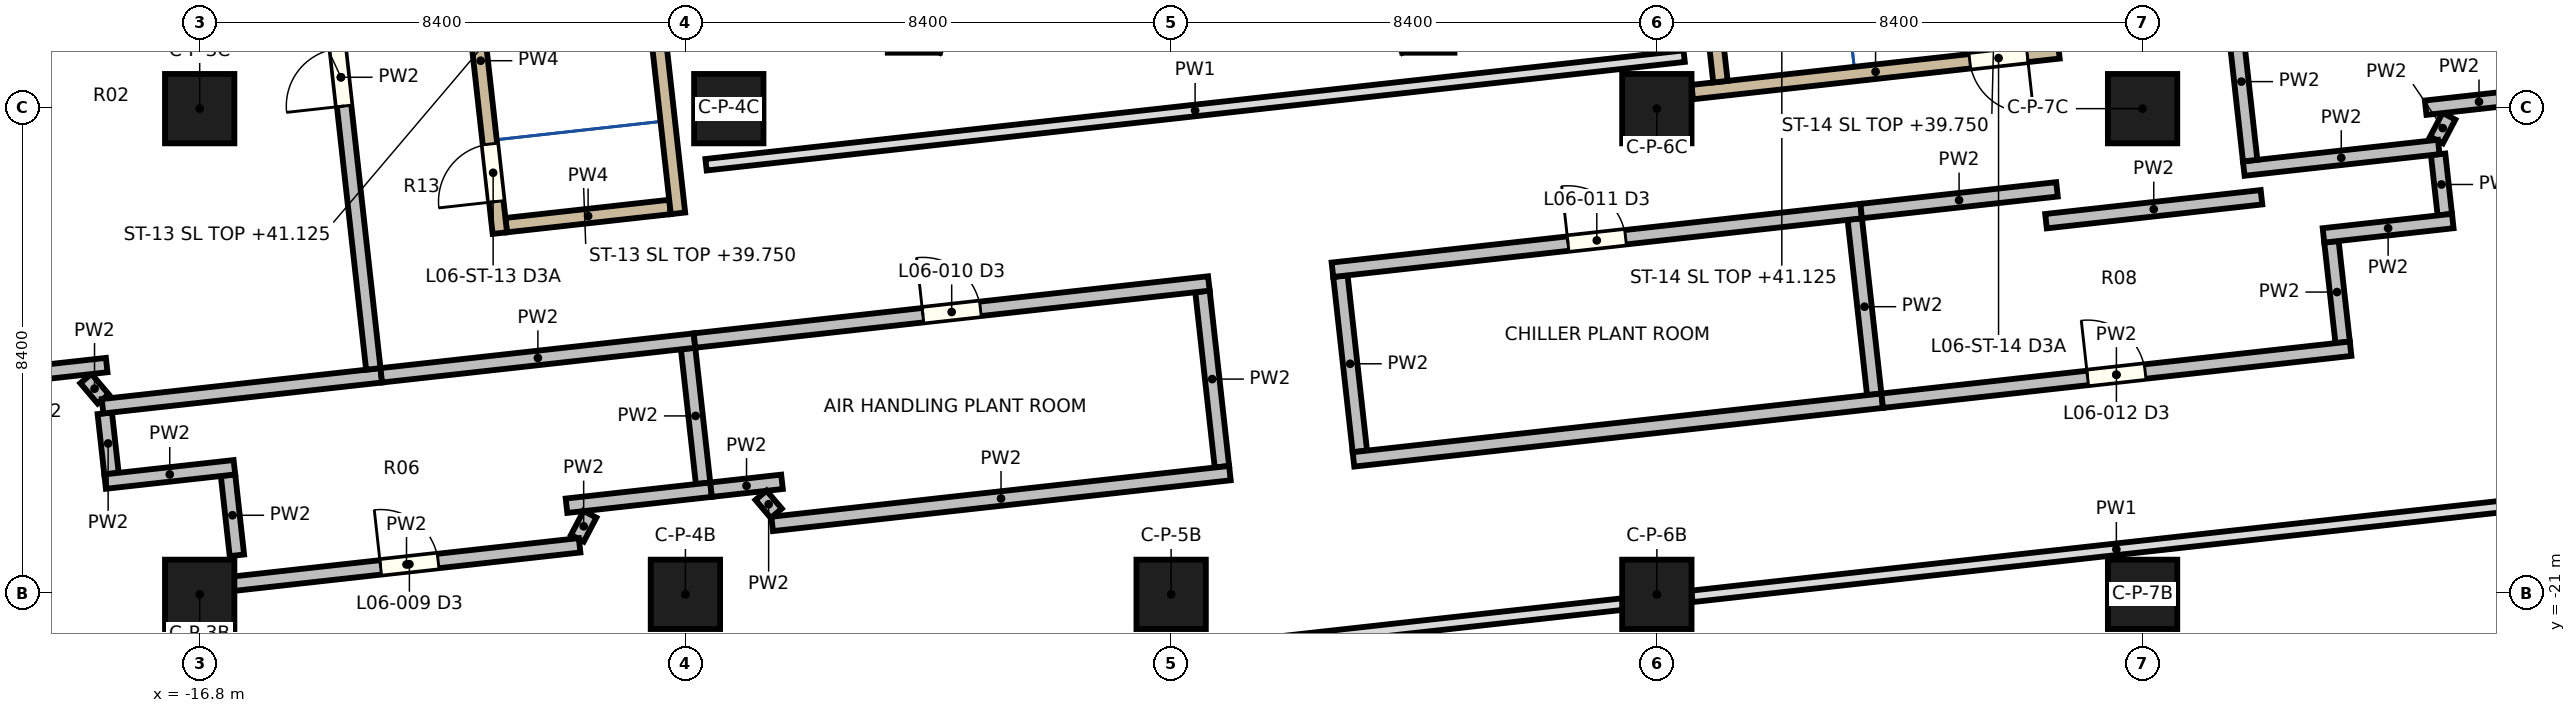
"""IFC4 building model, lengths in metres.
Left out: names, types, materials, properties, quantities, classifications, styles, units other than length and angle.
Written with IfcOpenShell. Run it as: python <this file> out.ifc"""

import sys

from ifc_helpers import new_model, si_unit, direction, frame, frame_2d, origin, origin_2d, place, context, subcontext, project, spatial, rectangle, extrude, element, fill, save


model = new_model("IFC4")
c1 = context("Model", 3, precision=1e-05, world=origin(), true_north=direction((0.0, 1.0)))
c2 = subcontext(c1, "Body", "Model", "MODEL_VIEW")
j1 = project(units=[si_unit("LENGTHUNIT", "METRE"), si_unit("PLANEANGLEUNIT", "RADIAN")], contexts=[c1])
p1 = place(None, origin())
s1 = spatial("IfcSite", under=j1, at=p1, CompositionType="ELEMENT")
p2 = place(p1, origin())
s2 = spatial("IfcBuilding", under=s1, at=p2, CompositionType="ELEMENT")
p3 = place(p2, frame((0.0, 0.0, 37.0)))
s3 = spatial("IfcBuildingStorey", under=s2, at=p3, CompositionType="ELEMENT", Elevation=37.0)
for number, where, z_axis, x_axis in (
    (1, (-16.8, -21.0, 0.0), (0.0, 0.0, 1.0), (1.0, 0.0, 0.0)),
    (2, (-16.8, -12.6, 0.0), (0.0, 0.0, 1.0), (1.0, 0.0, 0.0)),
    (3, (-8.4, -21.0, 0.0), (0.0, 0.0, 1.0), (1.0, 0.0, 0.0)),
    (4, (-7.65, -12.6, 0.0), (0.0, 0.0, 1.0), (1.0, 0.0, 0.0)),
    (5, (0.0, -21.0, 0.0), (0.0, 0.0, 1.0), (1.0, 0.0, 0.0)),
    (6, (8.4, -21.0, 0.0), (0.0, 0.0, 1.0), (1.0, 0.0, 0.0)),
    (7, (8.4, -12.6, 0.0), (0.0, 0.0, 1.0), (1.0, 0.0, 0.0)),
    (8, (16.8, -21.0, 0.0), (0.0, 0.0, 1.0), (1.0, 0.0, 0.0)),
    (9, (16.8, -12.6, 0.0), (0.0, 0.0, 1.0), (1.0, 0.0, 0.0)),
):
    element("IfcColumn", number, at=place(p3, frame(where, z_axis=z_axis, x_axis=x_axis)), inside=s3, PredefinedType="COLUMN", context=c2, shape_type="SweptSolid", body=[
        extrude(rectangle(XDim=1.2, YDim=1.2, at=origin_2d()), origin(), (0.0, 0.0, 1.0), 4.3),
    ])
p4 = place(p3, frame((-8.043, -13.57, 0.0), z_axis=(0.0, 0.0, 1.0), x_axis=(0.993897022694, 0.110311868264, 0.0)))
e10 = element("IfcWall", 10, at=p4, inside=s3, PredefinedType="PARTITIONING", context=c2, shape_type="SweptSolid", body=[
    extrude(rectangle(XDim=17.019, YDim=0.2, at=frame_2d((8.51, 0.0))), origin(), (0.0, 0.0, 1.0), 4.3),
])
p5 = place(p3, frame((-18.326, -18.912, 0.0), z_axis=(0.0, 0.0, 1.0), x_axis=(-0.110201865026, 0.993909225707, 0.0)))
e11 = element("IfcWall", 11, at=p5, inside=s3, PredefinedType="PARTITIONING", context=c2, shape_type="SweptSolid", body=[
    extrude(rectangle(XDim=1.05, YDim=0.25, at=frame_2d((0.525, 0.0))), origin(), (0.0, 0.0, 1.0), 4.3),
])
p6 = place(p3, frame((-18.469, -17.62, 0.0), z_axis=(0.0, 0.0, 1.0), x_axis=(-0.647265523575, 0.762264614154, 0.0)))
e12 = element("IfcWall", 12, at=p6, inside=s3, PredefinedType="PARTITIONING", context=c2, shape_type="SweptSolid", body=[
    extrude(rectangle(XDim=0.463, YDim=0.25, at=frame_2d((0.231, 0.0))), origin(), (0.0, 0.0, 1.0), 4.3),
])
p7 = place(p3, frame((-16.156, -20.325, 0.0), z_axis=(0.0, 0.0, 1.0), x_axis=(-0.110354623568, 0.993892276385, 0.0)))
e13 = element("IfcWall", 13, at=p7, inside=s3, PredefinedType="PARTITIONING", context=c2, shape_type="SweptSolid", body=[
    extrude(rectangle(XDim=1.394, YDim=0.25, at=frame_2d((0.697, 0.0))), origin(), (0.0, 0.0, 1.0), 4.3),
])
p8 = place(p3, frame((-8.095, -19.08, 0.0), z_axis=(0.0, 0.0, 1.0), x_axis=(-0.110351542432, 0.993892618487, 0.0)))
e14 = element("IfcWall", 14, at=p8, inside=s3, PredefinedType="PARTITIONING", context=c2, shape_type="SweptSolid", body=[
    extrude(rectangle(XDim=2.345, YDim=0.25, at=frame_2d((1.173, 0.0))), origin(), (0.0, 0.0, 1.0), 4.3),
])
for number, where, z_axis, x_axis in (
    (15, (0.878, -18.793, 0.0), (0.0, 0.0, 1.0), (-0.11, 0.994, 0.0)),
    (16, (12.159, -17.541, 0.0), (0.0, 0.0, 1.0), (-0.11, 0.994, 0.0)),
):
    element("IfcWall", number, at=place(p3, frame(where, z_axis=z_axis, x_axis=x_axis)), inside=s3, PredefinedType="PARTITIONING", context=c2, shape_type="SweptSolid", body=[
        extrude(rectangle(XDim=3.05, YDim=0.25, at=frame_2d((1.525, 0.0))), origin(), (0.0, 0.0, 1.0), 4.3),
    ])
p9 = place(p3, frame((3.264, -18.528, 0.0), z_axis=(0.0, 0.0, 1.0), x_axis=(-0.110378814906, 0.993889590055, 0.0)))
e17 = element("IfcWall", 17, at=p9, inside=s3, PredefinedType="PARTITIONING", context=c2, shape_type="SweptSolid", body=[
    extrude(rectangle(XDim=3.05, YDim=0.25, at=frame_2d((1.525, 0.0))), origin(), (0.0, 0.0, 1.0), 4.3),
])
p10 = place(p3, frame((20.26, -16.642, 0.0), z_axis=(0.0, 0.0, 1.0), x_axis=(-0.11035496361, 0.993892238629, 0.0)))
e18 = element("IfcWall", 18, at=p10, inside=s3, PredefinedType="PARTITIONING", context=c2, shape_type="SweptSolid", body=[
    extrude(rectangle(XDim=1.75, YDim=0.25, at=frame_2d((0.875, 0.0))), origin(), (0.0, 0.0, 1.0), 4.3),
])
p11 = place(p3, frame((22.027, -14.433, 0.0), z_axis=(0.0, 0.0, 1.0), x_axis=(-0.110201865026, 0.993909225707, 0.0)))
e19 = element("IfcWall", 19, at=p11, inside=s3, PredefinedType="PARTITIONING", context=c2, shape_type="SweptSolid", body=[
    extrude(rectangle(XDim=1.05, YDim=0.25, at=frame_2d((0.525, 0.0))), origin(), (0.0, 0.0, 1.0), 4.3),
])
p12 = place(p3, frame((21.883, -13.141, 0.0), z_axis=(0.0, 0.0, 1.0), x_axis=(0.464223811287, 0.885717930853, 0.0)))
e20 = element("IfcWall", 20, at=p12, inside=s3, PredefinedType="PARTITIONING", context=c2, shape_type="SweptSolid", body=[
    extrude(rectangle(XDim=0.463, YDim=0.25, at=frame_2d((0.231, 0.0))), origin(), (0.0, 0.0, 1.0), 4.3),
])
p13 = place(p3, frame((-18.48, -17.747, 0.0), z_axis=(0.0, 0.0, 1.0), x_axis=(0.993899072422, 0.11029339889, 0.0)))
e21 = element("IfcWall", 21, at=p13, inside=s3, PredefinedType="PARTITIONING", context=c2, shape_type="SweptSolid", body=[
    extrude(rectangle(XDim=4.85, YDim=0.25, at=frame_2d((2.425, 0.0))), origin(), (0.0, 0.0, 1.0), 4.3),
])
p14 = place(p3, frame((-13.66, -17.212, 0.0), z_axis=(0.0, 0.0, 1.0), x_axis=(0.993894655727, 0.110333192277, 0.0)))
e22 = element("IfcWall", 22, at=p14, inside=s3, PredefinedType="PARTITIONING", context=c2, shape_type="SweptSolid", body=[
    extrude(rectangle(XDim=5.45, YDim=0.25, at=frame_2d((2.725, 0.0))), origin(), (0.0, 0.0, 1.0), 4.3),
])
p15 = place(p3, frame((-8.243, -16.611, 0.0), z_axis=(0.0, 0.0, 1.0), x_axis=(0.993896701795, 0.110314759491, 0.0)))
e23 = element("IfcWall", 23, at=p15, inside=s3, PredefinedType="PARTITIONING", context=c2, shape_type="SweptSolid", body=[
    extrude(rectangle(XDim=8.95, YDim=0.25, at=frame_2d((4.475, 0.0))), origin(), (0.0, 0.0, 1.0), 4.3),
])
p16 = place(p15, frame((3.975, 0.0, 0.0)))
e24 = element("IfcOpeningElement", 24, at=p16, cuts=e23, PredefinedType="OPENING", context=c2, shape_type="SweptSolid", body=[
    extrude(rectangle(XDim=1.0, YDim=2.1, at=frame_2d((0.5, 1.05))), frame((0.0, 0.135, 0.0), z_axis=(0.0, -1.0, 0.0), x_axis=(1.0, 0.0, 0.0)), (0.0, 0.0, 1.0), 0.27),
])
p17 = place(p3, frame((2.789, -15.386, 0.0), z_axis=(0.0, 0.0, 1.0), x_axis=(0.993896672807, 0.110315020662, 0.0)))
e25 = element("IfcWall", 25, at=p17, inside=s3, PredefinedType="PARTITIONING", context=c2, shape_type="SweptSolid", body=[
    extrude(rectangle(XDim=9.2, YDim=0.25, at=frame_2d((4.6, 0.0))), origin(), (0.0, 0.0, 1.0), 4.3),
])
p18 = place(p17, frame((4.1, 0.0, 0.0)))
e26 = element("IfcOpeningElement", 26, at=p18, cuts=e25, PredefinedType="OPENING", context=c2, shape_type="SweptSolid", body=[
    extrude(rectangle(XDim=1.0, YDim=2.1, at=frame_2d((0.5, 1.05))), frame((0.0, 0.135, 0.0), z_axis=(0.0, -1.0, 0.0), x_axis=(1.0, 0.0, 0.0)), (0.0, 0.0, 1.0), 0.27),
])
p19 = place(p3, frame((11.933, -14.371, 0.0), z_axis=(0.0, 0.0, 1.0), x_axis=(0.993894215195, 0.110337160568, 0.0)))
e27 = element("IfcWall", 27, at=p19, inside=s3, PredefinedType="PARTITIONING", context=c2, shape_type="SweptSolid", body=[
    extrude(rectangle(XDim=3.407, YDim=0.25, at=frame_2d((1.704, 0.0))), origin(), (0.0, 0.0, 1.0), 4.3),
])
p20 = place(p3, frame((18.55, -13.637, 0.0), z_axis=(0.0, 0.0, 1.0), x_axis=(0.993896015074, 0.110320946427, 0.0)))
e28 = element("IfcWall", 28, at=p20, inside=s3, PredefinedType="PARTITIONING", context=c2, shape_type="SweptSolid", body=[
    extrude(rectangle(XDim=3.393, YDim=0.25, at=frame_2d((1.696, 0.0))), origin(), (0.0, 0.0, 1.0), 4.3),
])
p21 = place(p3, frame((18.66, -13.499, 0.0), z_axis=(0.0, 0.0, 1.0), x_axis=(-0.110265872382, 0.993902126664, 0.0)))
e29 = element("IfcWall", 29, at=p21, inside=s3, PredefinedType="PARTITIONING", context=c2, shape_type="SweptSolid", body=[
    extrude(rectangle(XDim=2.75, YDim=0.25, at=frame_2d((1.375, 0.0))), origin(), (0.0, 0.0, 1.0), 4.3),
])
p22 = place(p3, frame((-20.645, -17.283, 0.0), z_axis=(0.0, 0.0, 1.0), x_axis=(0.993904888096, 0.110240978854, 0.0)))
e30 = element("IfcWall", 30, at=p22, inside=s3, PredefinedType="PARTITIONING", context=c2, shape_type="SweptSolid", body=[
    extrude(rectangle(XDim=2.25, YDim=0.25, at=frame_2d((1.125, 0.0))), origin(), (0.0, 0.0, 1.0), 4.3),
])
p23 = place(p3, frame((21.696, -12.583, 0.0), z_axis=(0.0, 0.0, 1.0), x_axis=(0.993893354283, 0.11034491521, 0.0)))
e31 = element("IfcWall", 31, at=p23, inside=s3, PredefinedType="PARTITIONING", context=c2, shape_type="SweptSolid", body=[
    extrude(rectangle(XDim=1.856, YDim=0.25, at=frame_2d((0.928, 0.0))), origin(), (0.0, 0.0, 1.0), 4.3),
])
p24 = place(p3, frame((-18.436, -19.05, 0.0), z_axis=(0.0, 0.0, 1.0), x_axis=(0.99389299368, 0.110348163163, 0.0)))
e32 = element("IfcWall", 32, at=p24, inside=s3, PredefinedType="PARTITIONING", context=c2, shape_type="SweptSolid", body=[
    extrude(rectangle(XDim=2.25, YDim=0.25, at=frame_2d((1.125, 0.0))), origin(), (0.0, 0.0, 1.0), 4.3),
])
p25 = place(p3, frame((19.928, -14.792, 0.0), z_axis=(0.0, 0.0, 1.0), x_axis=(0.993891672249, 0.110360064491, 0.0)))
e33 = element("IfcWall", 33, at=p25, inside=s3, PredefinedType="PARTITIONING", context=c2, shape_type="SweptSolid", body=[
    extrude(rectangle(XDim=2.25, YDim=0.25, at=frame_2d((1.125, 0.0))), origin(), (0.0, 0.0, 1.0), 4.3),
])
p26 = place(p3, frame((-10.457, -19.468, 0.0), z_axis=(0.0, 0.0, 1.0), x_axis=(0.993890835237, 0.110367602272, 0.0)))
e34 = element("IfcWall", 34, at=p26, inside=s3, PredefinedType="PARTITIONING", context=c2, shape_type="SweptSolid", body=[
    extrude(rectangle(XDim=2.515, YDim=0.25, at=frame_2d((1.258, 0.0))), origin(), (0.0, 0.0, 1.0), 4.3),
])
p27 = place(p3, frame((-7.957, -19.19, 0.0), z_axis=(0.0, 0.0, 1.0), x_axis=(0.993895784331, 0.110323025195, 0.0)))
e35 = element("IfcWall", 35, at=p27, inside=s3, PredefinedType="PARTITIONING", context=c2, shape_type="SweptSolid", body=[
    extrude(rectangle(XDim=1.235, YDim=0.25, at=frame_2d((0.617, 0.0))), origin(), (0.0, 0.0, 1.0), 4.3),
])
p28 = place(p3, frame((-10.268, -20.03, 0.0), z_axis=(0.0, 0.0, 1.0), x_axis=(0.464221133473, 0.885719334348, 0.0)))
e36 = element("IfcWall", 36, at=p28, inside=s3, PredefinedType="PARTITIONING", context=c2, shape_type="SweptSolid", body=[
    extrude(rectangle(XDim=0.469, YDim=0.25, at=frame_2d((0.234, 0.0))), origin(), (0.0, 0.0, 1.0), 4.3),
])
p29 = place(p3, frame((-16.217, -20.816, 0.0), z_axis=(0.0, 0.0, 1.0), x_axis=(0.993900528006, 0.110280281234, 0.0)))
e37 = element("IfcWall", 37, at=p29, inside=s3, PredefinedType="PARTITIONING", context=c2, shape_type="SweptSolid", body=[
    extrude(rectangle(XDim=6.024, YDim=0.25, at=frame_2d((3.012, 0.0))), origin(), (0.0, 0.0, 1.0), 4.3),
])
p30 = place(p29, frame((2.562, 0.0, 0.0)))
e38 = element("IfcOpeningElement", 38, at=p30, cuts=e37, PredefinedType="OPENING", context=c2, shape_type="SweptSolid", body=[
    extrude(rectangle(XDim=1.0, YDim=2.1, at=frame_2d((0.5, 1.05))), frame((0.0, 0.135, 0.0), z_axis=(0.0, -1.0, 0.0), x_axis=(1.0, 0.0, 0.0)), (0.0, 0.0, 1.0), 0.27),
])
p31 = place(p3, frame((-6.9, -19.782, 0.0), z_axis=(0.0, 0.0, 1.0), x_axis=(0.993897183523, 0.110310419203, 0.0)))
e39 = element("IfcWall", 39, at=p31, inside=s3, PredefinedType="PARTITIONING", context=c2, shape_type="SweptSolid", body=[
    extrude(rectangle(XDim=7.965, YDim=0.25, at=frame_2d((3.983, 0.0))), origin(), (0.0, 0.0, 1.0), 4.3),
])
p32 = place(p3, frame((3.153, -18.666, 0.0), z_axis=(0.0, 0.0, 1.0), x_axis=(0.993896672807, 0.110315020662, 0.0)))
e40 = element("IfcWall", 40, at=p32, inside=s3, PredefinedType="PARTITIONING", context=c2, shape_type="SweptSolid", body=[
    extrude(rectangle(XDim=9.2, YDim=0.25, at=frame_2d((4.6, 0.0))), origin(), (0.0, 0.0, 1.0), 4.3),
])
p33 = place(p3, frame((12.297, -17.651, 0.0), z_axis=(0.0, 0.0, 1.0), x_axis=(0.99389870336, 0.110296724608, 0.0)))
e41 = element("IfcWall", 41, at=p33, inside=s3, PredefinedType="PARTITIONING", context=c2, shape_type="SweptSolid", body=[
    extrude(rectangle(XDim=8.15, YDim=0.25, at=frame_2d((4.075, 0.0))), origin(), (0.0, 0.0, 1.0), 4.3),
])
p34 = place(p33, frame((3.575, 0.0, 0.0)))
e42 = element("IfcOpeningElement", 42, at=p34, cuts=e41, PredefinedType="OPENING", context=c2, shape_type="SweptSolid", body=[
    extrude(rectangle(XDim=1.0, YDim=2.1, at=frame_2d((0.5, 1.05))), frame((0.0, 0.135, 0.0), z_axis=(0.0, -1.0, 0.0), x_axis=(1.0, 0.0, 0.0)), (0.0, 0.0, 1.0), 0.27),
])
p35 = place(p3, frame((-6.829, -19.598, 0.0), z_axis=(0.0, 0.0, 1.0), x_axis=(-0.647093240386, 0.76241087233, 0.0)))
e43 = element("IfcWall", 43, at=p35, inside=s3, PredefinedType="PARTITIONING", context=c2, shape_type="SweptSolid", body=[
    extrude(rectangle(XDim=0.409, YDim=0.25, at=frame_2d((0.204, 0.0))), origin(), (0.0, 0.0, 1.0), 4.3),
])
p36 = place(p3, frame((15.129, -14.546, 0.0), z_axis=(0.0, 0.0, 1.0), x_axis=(0.993900395612, 0.110281474433, 0.0)))
e44 = element("IfcWall", 44, at=p36, inside=s3, PredefinedType="PARTITIONING", context=c2, shape_type="SweptSolid", body=[
    extrude(rectangle(XDim=3.75, YDim=0.25, at=frame_2d((1.875, 0.0))), origin(), (0.0, 0.0, 1.0), 4.3),
])
p37 = place(p3, frame((-13.798, -17.101, 0.0), z_axis=(0.0, 0.0, 1.0), x_axis=(-0.110333844475, 0.993894583325, 0.0)))
e45 = element("IfcWall", 45, at=p37, inside=s3, PredefinedType="PARTITIONING", context=c2, shape_type="SweptSolid", body=[
    extrude(rectangle(XDim=10.15, YDim=0.25, at=frame_2d((5.075, 0.0))), origin(), (0.0, 0.0, 1.0), 4.3),
])
p38 = place(p37, frame((4.575, 0.0, 0.0)))
e46 = element("IfcOpeningElement", 46, at=p38, cuts=e45, PredefinedType="OPENING", context=c2, shape_type="SweptSolid", body=[
    extrude(rectangle(XDim=1.0, YDim=2.1, at=frame_2d((0.5, 1.05))), frame((0.0, 0.135, 0.0), z_axis=(0.0, -1.0, 0.0), x_axis=(1.0, 0.0, 0.0)), (0.0, 0.0, 1.0), 0.27),
])
p39 = place(p3, frame((-18.854, -24.127, 0.0), z_axis=(0.0, 0.0, 1.0), x_axis=(0.993896821063, 0.11031368492, 0.0)))
e47 = element("IfcWall", 47, at=p39, inside=s3, PredefinedType="PARTITIONING", context=c2, shape_type="SweptSolid", body=[
    extrude(rectangle(XDim=26.832, YDim=0.2, at=frame_2d((13.416, 0.0))), origin(), (0.0, 0.0, 1.0), 4.3),
])
p40 = place(p3, frame((9.008, -21.035, 0.0), z_axis=(0.0, 0.0, 1.0), x_axis=(0.993898241908, 0.110300882735, 0.0)))
e48 = element("IfcWall", 48, at=p40, inside=s3, PredefinedType="PARTITIONING", context=c2, shape_type="SweptSolid", body=[
    extrude(rectangle(XDim=14.768, YDim=0.2, at=frame_2d((7.384, 0.0))), origin(), (0.0, 0.0, 1.0), 4.3),
])
p41 = place(p3, frame((-8.667, -14.3, 0.0), z_axis=(0.0, 0.0, 1.0), x_axis=(-0.993904609394, -0.110243491536, 0.0)))
e49 = element("IfcWall", 49, at=p41, inside=s3, PredefinedType="SOLIDWALL", context=c2, shape_type="SweptSolid", body=[
    extrude(rectangle(XDim=2.85, YDim=0.25, at=frame_2d((1.425, 0.0))), origin(), (0.0, 0.0, 1.0), 4.3),
])
p42 = place(p3, frame((-11.61, -14.753, 0.0), z_axis=(0.0, 0.0, 1.0), x_axis=(-0.110310943534, 0.993897125329, 0.0)))
e50 = element("IfcWall", 50, at=p42, inside=s3, PredefinedType="SOLIDWALL", context=c2, shape_type="SweptSolid", body=[
    extrude(rectangle(XDim=6.0, YDim=0.25, at=frame_2d((3.0, 0.0))), origin(), (0.0, 0.0, 1.0), 4.3),
])
p43 = place(p42, frame((0.55, 0.0, 0.0)))
e51 = element("IfcOpeningElement", 51, at=p43, cuts=e50, PredefinedType="OPENING", context=c2, shape_type="SweptSolid", body=[
    extrude(rectangle(XDim=1.0, YDim=2.1, at=frame_2d((0.5, 1.05))), frame((0.0, 0.135, 0.0), z_axis=(0.0, -1.0, 0.0), x_axis=(1.0, 0.0, 0.0)), (0.0, 0.0, 1.0), 0.27),
])
p44 = place(p3, frame((-9.22, -8.178, 0.0), z_axis=(0.0, 0.0, 1.0), x_axis=(0.110299055694, -0.993898444668, 0.0)))
e52 = element("IfcWall", 52, at=p44, inside=s3, PredefinedType="SOLIDWALL", context=c2, shape_type="SweptSolid", body=[
    extrude(rectangle(XDim=6.271, YDim=0.25, at=frame_2d((3.135, 0.0))), origin(), (0.0, 0.0, 1.0), 4.3),
])
p45 = place(p3, frame((15.353, -11.61, 0.0), z_axis=(0.0, 0.0, 1.0), x_axis=(-0.993898660621, -0.110297109738, 0.0)))
e53 = element("IfcWall", 53, at=p45, inside=s3, PredefinedType="SOLIDWALL", context=c2, shape_type="SweptSolid", body=[
    extrude(rectangle(XDim=6.379, YDim=0.25, at=frame_2d((3.189, 0.0))), origin(), (0.0, 0.0, 1.0), 4.3),
])
p46 = place(p45, frame((0.55, 0.0, 0.0)))
e54 = element("IfcOpeningElement", 54, at=p46, cuts=e53, PredefinedType="OPENING", context=c2, shape_type="SweptSolid", body=[
    extrude(rectangle(XDim=1.0, YDim=2.1, at=frame_2d((0.5, 1.05))), frame((0.0, 0.135, 0.0), z_axis=(0.0, -1.0, 0.0), x_axis=(1.0, 0.0, 0.0)), (0.0, 0.0, 1.0), 0.27),
])
p47 = place(p3, frame((9.5, -12.134, 0.0), z_axis=(0.0, 0.0, 1.0), x_axis=(-0.110328108544, 0.993895220063, 0.0)))
e55 = element("IfcWall", 55, at=p47, inside=s3, PredefinedType="SOLIDWALL", context=c2, shape_type="SweptSolid", body=[
    extrude(rectangle(XDim=2.85, YDim=0.25, at=frame_2d((1.425, 0.0))), origin(), (0.0, 0.0, 1.0), 4.3),
])
p48 = place(p30, origin())
e56 = element("IfcDoor", 56, at=p48, inside=s3, PredefinedType="DOOR", context=c2, shape_type="SweptSolid", body=[
    extrude(rectangle(XDim=1.0, YDim=2.1, at=frame_2d((0.5, 1.05))), frame((0.0, 0.025, 0.0), z_axis=(0.0, -1.0, 0.0), x_axis=(1.0, 0.0, 0.0)), (0.0, 0.0, 1.0), 0.05),
])
fill(e38, e56)
p49 = place(p16, origin())
e57 = element("IfcDoor", 57, at=p49, inside=s3, PredefinedType="DOOR", context=c2, shape_type="SweptSolid", body=[
    extrude(rectangle(XDim=1.0, YDim=2.1, at=frame_2d((0.5, 1.05))), frame((0.0, 0.025, 0.0), z_axis=(0.0, -1.0, 0.0), x_axis=(1.0, 0.0, 0.0)), (0.0, 0.0, 1.0), 0.05),
])
fill(e24, e57)
p50 = place(p18, origin())
e58 = element("IfcDoor", 58, at=p50, inside=s3, PredefinedType="DOOR", context=c2, shape_type="SweptSolid", body=[
    extrude(rectangle(XDim=1.0, YDim=2.1, at=frame_2d((0.5, 1.05))), frame((0.0, 0.025, 0.0), z_axis=(0.0, -1.0, 0.0), x_axis=(1.0, 0.0, 0.0)), (0.0, 0.0, 1.0), 0.05),
])
fill(e26, e58)
p51 = place(p34, origin())
e59 = element("IfcDoor", 59, at=p51, inside=s3, PredefinedType="DOOR", context=c2, shape_type="SweptSolid", body=[
    extrude(rectangle(XDim=1.0, YDim=2.1, at=frame_2d((0.5, 1.05))), frame((0.0, 0.025, 0.0), z_axis=(0.0, -1.0, 0.0), x_axis=(1.0, 0.0, 0.0)), (0.0, 0.0, 1.0), 0.05),
])
fill(e42, e59)
p52 = place(p38, origin())
e60 = element("IfcDoor", 60, at=p52, inside=s3, PredefinedType="DOOR", context=c2, shape_type="SweptSolid", body=[
    extrude(rectangle(XDim=1.0, YDim=2.1, at=frame_2d((0.5, 1.05))), frame((0.0, 0.025, 0.0), z_axis=(0.0, -1.0, 0.0), x_axis=(1.0, 0.0, 0.0)), (0.0, 0.0, 1.0), 0.05),
])
fill(e46, e60)
p53 = place(p43, origin())
e61 = element("IfcDoor", 61, at=p53, inside=s3, PredefinedType="DOOR", context=c2, shape_type="SweptSolid", body=[
    extrude(rectangle(XDim=1.0, YDim=2.1, at=frame_2d((0.5, 1.05))), frame((0.0, 0.025, 0.0), z_axis=(0.0, -1.0, 0.0), x_axis=(1.0, 0.0, 0.0)), (0.0, 0.0, 1.0), 0.05),
])
fill(e51, e61)
p54 = place(p46, origin())
e62 = element("IfcDoor", 62, at=p54, inside=s3, PredefinedType="DOOR", context=c2, shape_type="SweptSolid", body=[
    extrude(rectangle(XDim=1.0, YDim=2.1, at=frame_2d((0.5, 1.05))), frame((0.0, 0.025, 0.0), z_axis=(0.0, -1.0, 0.0), x_axis=(1.0, 0.0, 0.0)), (0.0, 0.0, 1.0), 0.05),
])
fill(e54, e62)
save(model, sys.argv[1])
